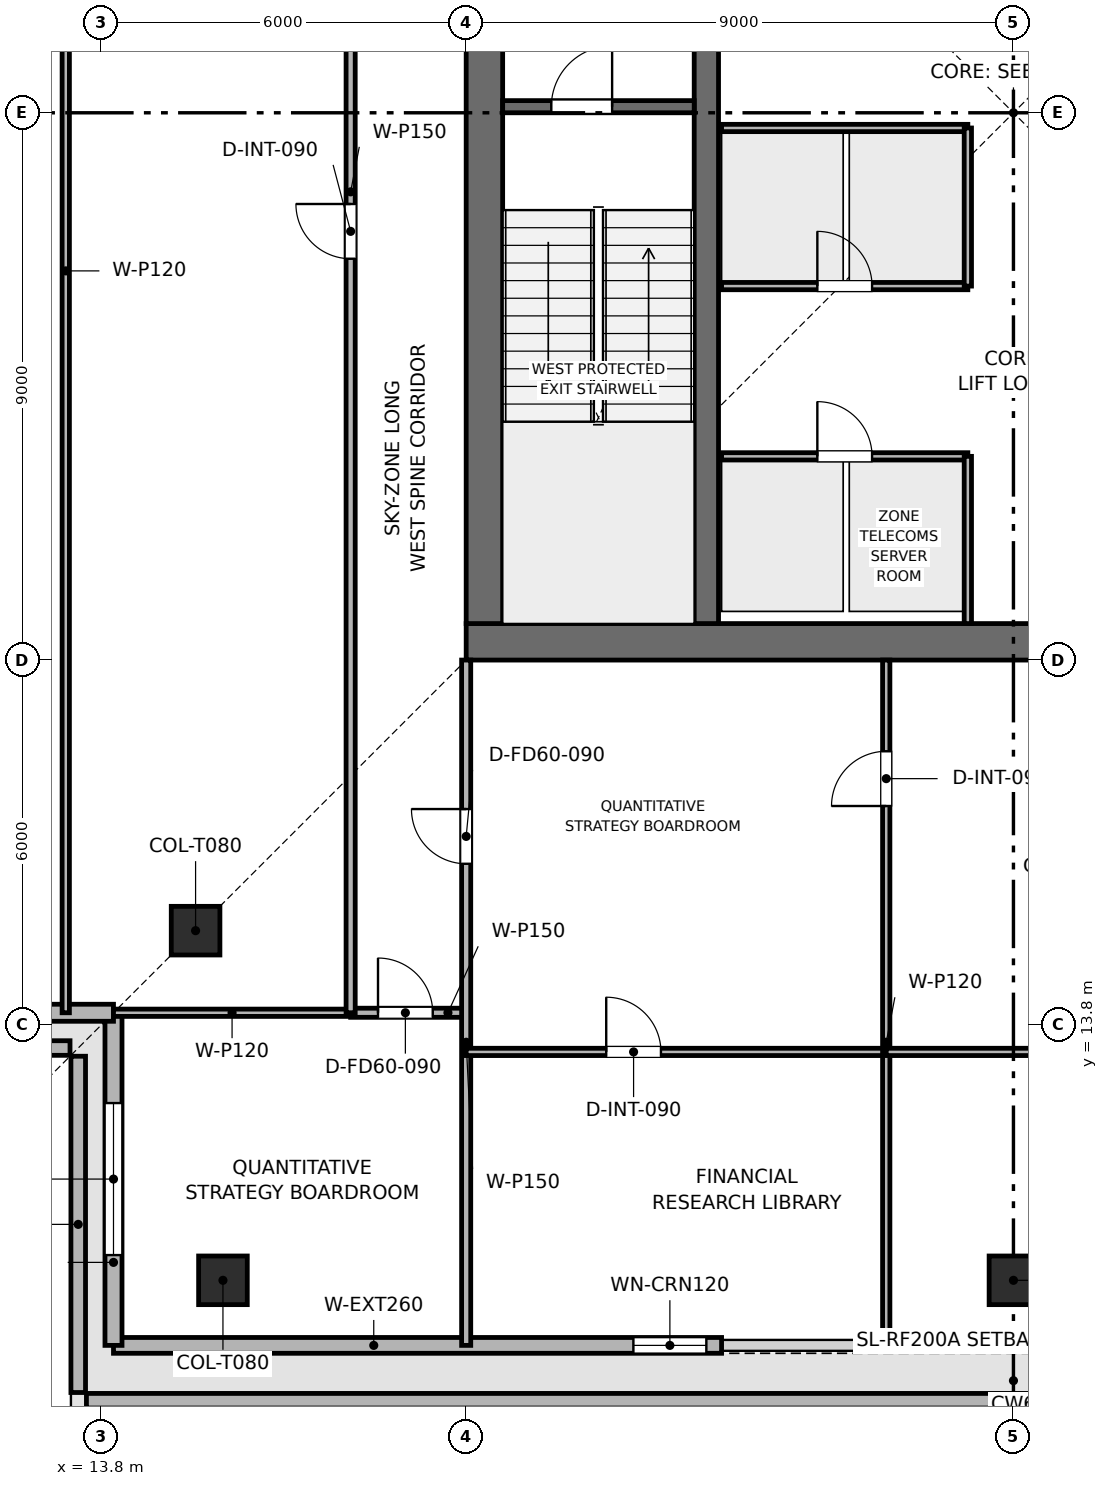
"""IFC4 building model, lengths in metres.
Left out: names, types, materials, properties, quantities, classifications, styles, units other than length and angle.
Written with IfcOpenShell. Run it as: python <this file> out.ifc"""

import sys

from ifc_helpers import new_model, si_unit, direction, frame, frame_2d, origin, origin_2d, place, context, subcontext, project, spatial, rectangle, extrude, element, fill, save


model = new_model("IFC4")
c1 = context("Model", 3, precision=1e-05, world=origin(), true_north=direction((0.0, 1.0)))
c2 = subcontext(c1, "Body", "Model", "MODEL_VIEW")
j1 = project(units=[si_unit("LENGTHUNIT", "METRE"), si_unit("PLANEANGLEUNIT", "RADIAN")], contexts=[c1])
p1 = place(None, origin())
s1 = spatial("IfcSite", under=j1, at=p1, CompositionType="ELEMENT")
p2 = place(p1, origin())
s2 = spatial("IfcBuilding", under=s1, at=p2, CompositionType="ELEMENT")
p3 = place(p2, frame((0.0, 0.0, 355.5)))
s3 = spatial("IfcBuildingStorey", under=s2, at=p3, CompositionType="ELEMENT", Elevation=355.5)
p4 = place(p3, frame((19.8, 20.1, 0.0), z_axis=(0.0, 0.0, 1.0), x_axis=(1.0, 0.0, 0.0)))
e1 = element("IfcWall", 1, at=p4, inside=s3, PredefinedType="SHEAR", context=c2, shape_type="SweptSolid", body=[
    extrude(rectangle(XDim=18.0, YDim=0.6, at=frame_2d((9.0, 0.0))), origin(), (0.0, 0.0, 1.0), 4.5),
])
p5 = place(p3, frame((20.1, 20.4, 0.0), z_axis=(0.0, 0.0, 1.0), x_axis=(0.0, 1.0, 0.0)))
e2 = element("IfcWall", 2, at=p5, inside=s3, PredefinedType="SHEAR", context=c2, shape_type="SweptSolid", body=[
    extrude(rectangle(XDim=16.8, YDim=0.6, at=frame_2d((8.4, 0.0))), origin(), (0.0, 0.0, 1.0), 4.5),
])
p6 = place(p5, frame((10.4, 0.0, 0.0)))
e3 = element("IfcOpeningElement", 3, at=p6, cuts=e2, PredefinedType="OPENING", context=c2, shape_type="SweptSolid", body=[
    extrude(rectangle(XDim=1.1, YDim=2.15, at=frame_2d((0.55, 1.075))), frame((0.0, 0.31, 0.0), z_axis=(0.0, -1.0, 0.0), x_axis=(1.0, 0.0, 0.0)), (0.0, 0.0, 1.0), 0.62),
])
p7 = place(p3, frame((23.75, 20.4, 0.0), z_axis=(0.0, 0.0, 1.0), x_axis=(0.0, 1.0, 0.0)))
e4 = element("IfcWall", 4, at=p7, inside=s3, PredefinedType="SHEAR", context=c2, shape_type="SweptSolid", body=[
    extrude(rectangle(XDim=16.8, YDim=0.4, at=frame_2d((8.4, 0.0))), origin(), (0.0, 0.0, 1.0), 4.5),
])
for number, where, z_axis, x_axis in (
    (5, (15.8, 9.6, 0.003), (0.0, 0.0, 1.0), (1.0, 0.0, 0.0)),
    (6, (28.8, 9.6, 0.003), (0.0, 0.0, 1.0), (1.0, 0.0, 0.0)),
    (7, (15.35, 15.35, 0.003), (0.0, 0.0, 1.0), (1.0, 0.0, 0.0)),
):
    element("IfcColumn", number, at=place(p3, frame(where, z_axis=z_axis, x_axis=x_axis)), inside=s3, PredefinedType="COLUMN", context=c2, shape_type="SweptSolid", body=[
        extrude(rectangle(XDim=0.8, YDim=0.8, at=origin_2d()), origin(), (0.0, 0.0, 1.0), 4.234),
    ])
p8 = place(p3, frame((13.555, 7.62, 0.0), z_axis=(0.0, 0.0, 1.0), x_axis=(1.0, 0.0, 0.0)))
e8 = element("IfcWall", 8, at=p8, inside=s3, PredefinedType="PARAPET", context=c2, shape_type="SweptSolid", body=[
    extrude(rectangle(XDim=30.49, YDim=0.24, at=frame_2d((15.245, 0.0))), origin(), (0.0, 0.0, 1.0), 1.2),
])
for number, where, z_axis, x_axis in (
    (9, (7.755, 13.42, 0.0), (0.0, 0.0, 1.0), (1.0, 0.0, 0.0)),
    (10, (13.42, 13.285, 0.0), (0.0, 0.0, 1.0), (0.0, -1.0, 0.0)),
):
    element("IfcWall", number, at=place(p3, frame(where, z_axis=z_axis, x_axis=x_axis)), inside=s3, PredefinedType="PARAPET", context=c2, shape_type="SweptSolid", body=[
        extrude(rectangle(XDim=5.53, YDim=0.24, at=frame_2d((2.765, 0.0))), origin(), (0.0, 0.0, 1.0), 1.2),
    ])
p9 = place(p3, frame((24.0, 8.53, 0.0), z_axis=(0.0, 0.0, 1.0), x_axis=(-1.0, 0.0, 0.0)))
e11 = element("IfcWall", 11, at=p9, inside=s3, PredefinedType="SOLIDWALL", context=c2, shape_type="SweptSolid", body=[
    extrude(rectangle(XDim=10.0, YDim=0.26, at=frame_2d((5.0, 0.0))), origin(), (0.0, 0.0, 1.0), 4.24),
])
p10 = place(p9, frame((0.25, 0.0, 0.9)))
e12 = element("IfcOpeningElement", 12, at=p10, cuts=e11, PredefinedType="OPENING", context=c2, shape_type="SweptSolid", body=[
    extrude(rectangle(XDim=1.2, YDim=2.1, at=frame_2d((0.6, 1.05))), frame((0.0, 0.14, 0.0), z_axis=(0.0, -1.0, 0.0), x_axis=(1.0, 0.0, 0.0)), (0.0, 0.0, 1.0), 0.28),
])
p11 = place(p3, frame((14.0, 8.53, 0.0), z_axis=(0.0, 0.0, 1.0), x_axis=(0.0, 1.0, 0.0)))
e13 = element("IfcWall", 13, at=p11, inside=s3, PredefinedType="SOLIDWALL", context=c2, shape_type="SweptSolid", body=[
    extrude(rectangle(XDim=5.47, YDim=0.28, at=frame_2d((2.735, 0.0))), origin(), (0.0, 0.0, 1.0), 4.24),
])
p12 = place(p11, frame((1.485, 0.0, 0.9)))
e14 = element("IfcOpeningElement", 14, at=p12, cuts=e13, PredefinedType="OPENING", context=c2, shape_type="SweptSolid", body=[
    extrude(rectangle(XDim=2.5, YDim=1.9, at=frame_2d((1.25, 0.95))), frame((0.0, 0.15, 0.0), z_axis=(0.0, -1.0, 0.0), x_axis=(1.0, 0.0, 0.0)), (0.0, 0.0, 1.0), 0.3),
])
p13 = place(p3, frame((14.0, 14.0, 0.0), z_axis=(0.0, 0.0, 1.0), x_axis=(-1.0, 0.0, 0.0)))
e15 = element("IfcWall", 15, at=p13, inside=s3, PredefinedType="SOLIDWALL", context=c2, shape_type="SweptSolid", body=[
    extrude(rectangle(XDim=5.47, YDim=0.28, at=frame_2d((2.735, 0.0))), origin(), (0.0, 0.0, 1.0), 4.24),
])
p14 = place(p13, frame((1.485, 0.0, 0.9)))
e16 = element("IfcOpeningElement", 16, at=p14, cuts=e15, PredefinedType="OPENING", context=c2, shape_type="SweptSolid", body=[
    extrude(rectangle(XDim=2.5, YDim=1.9, at=frame_2d((1.25, 0.95))), frame((0.0, 0.15, 0.0), z_axis=(0.0, -1.0, 0.0), x_axis=(1.0, 0.0, 0.0)), (0.0, 0.0, 1.0), 0.3),
])
p15 = place(p3, frame((20.4, 28.9, 0.0), z_axis=(0.0, 0.0, 1.0), x_axis=(1.0, 0.0, 0.0)))
e17 = element("IfcWall", 17, at=p15, inside=s3, PredefinedType="SHEAR", context=c2, shape_type="SweptSolid", body=[
    extrude(rectangle(XDim=3.15, YDim=0.2, at=frame_2d((1.575, 0.0))), origin(), (0.0, 0.0, 1.0), 4.24),
])
p16 = place(p15, frame((0.8, 0.0, 0.0)))
e18 = element("IfcOpeningElement", 18, at=p16, cuts=e17, PredefinedType="OPENING", context=c2, shape_type="SweptSolid", body=[
    extrude(rectangle(XDim=1.0, YDim=2.1, at=frame_2d((0.5, 1.05))), frame((0.0, 0.11, 0.0), z_axis=(0.0, -1.0, 0.0), x_axis=(1.0, 0.0, 0.0)), (0.0, 0.0, 1.0), 0.22),
])
p17 = place(p3, frame((24.0, 23.15, 0.0), z_axis=(0.0, 0.0, 1.0), x_axis=(1.0, 0.0, 0.0)))
e19 = element("IfcWall", 19, at=p17, inside=s3, PredefinedType="PARTITIONING", context=c2, shape_type="SweptSolid", body=[
    extrude(rectangle(XDim=4.05, YDim=0.12, at=frame_2d((2.025, 0.0))), origin(), (0.0, 0.0, 1.0), 4.24),
])
p18 = place(p17, frame((1.575, 0.0, 0.0)))
e20 = element("IfcOpeningElement", 20, at=p18, cuts=e19, PredefinedType="OPENING", context=c2, shape_type="SweptSolid", body=[
    extrude(rectangle(XDim=0.9, YDim=2.1, at=frame_2d((0.45, 1.05))), frame((0.0, 0.07, 0.0), z_axis=(0.0, -1.0, 0.0), x_axis=(1.0, 0.0, 0.0)), (0.0, 0.0, 1.0), 0.14),
])
p19 = place(p3, frame((28.05, 20.4, 0.0), z_axis=(0.0, 0.0, 1.0), x_axis=(0.0, 1.0, 0.0)))
e21 = element("IfcWall", 21, at=p19, inside=s3, PredefinedType="PARTITIONING", context=c2, shape_type="SweptSolid", body=[
    extrude(rectangle(XDim=2.75, YDim=0.12, at=frame_2d((1.375, 0.0))), origin(), (0.0, 0.0, 1.0), 4.24),
])
p20 = place(p3, frame((24.0, 25.95, 0.0), z_axis=(0.0, 0.0, 1.0), x_axis=(1.0, 0.0, 0.0)))
e22 = element("IfcWall", 22, at=p20, inside=s3, PredefinedType="PARTITIONING", context=c2, shape_type="SweptSolid", body=[
    extrude(rectangle(XDim=4.05, YDim=0.12, at=frame_2d((2.025, 0.0))), origin(), (0.0, 0.0, 1.0), 4.24),
])
p21 = place(p20, frame((1.575, 0.0, 0.0)))
e23 = element("IfcOpeningElement", 23, at=p21, cuts=e22, PredefinedType="OPENING", context=c2, shape_type="SweptSolid", body=[
    extrude(rectangle(XDim=0.9, YDim=2.1, at=frame_2d((0.45, 1.05))), frame((0.0, 0.07, 0.0), z_axis=(0.0, -1.0, 0.0), x_axis=(1.0, 0.0, 0.0)), (0.0, 0.0, 1.0), 0.14),
])
p22 = place(p3, frame((24.0, 28.55, 0.0), z_axis=(0.0, 0.0, 1.0), x_axis=(1.0, 0.0, 0.0)))
e24 = element("IfcWall", 24, at=p22, inside=s3, PredefinedType="PARTITIONING", context=c2, shape_type="SweptSolid", body=[
    extrude(rectangle(XDim=4.05, YDim=0.12, at=frame_2d((2.025, 0.0))), origin(), (0.0, 0.0, 1.0), 4.24),
])
p23 = place(p3, frame((28.05, 25.95, 0.0), z_axis=(0.0, 0.0, 1.0), x_axis=(0.0, 1.0, 0.0)))
e25 = element("IfcWall", 25, at=p23, inside=s3, PredefinedType="PARTITIONING", context=c2, shape_type="SweptSolid", body=[
    extrude(rectangle(XDim=2.6, YDim=0.12, at=frame_2d((1.3, 0.0))), origin(), (0.0, 0.0, 1.0), 4.24),
])
p24 = place(p3, frame((13.215, 14.0, 0.0), z_axis=(0.0, 0.0, 1.0), x_axis=(0.0, 1.0, 0.0)))
e26 = element("IfcWall", 26, at=p24, inside=s3, PredefinedType="PARTITIONING", context=c2, shape_type="SweptSolid", body=[
    extrude(rectangle(XDim=25.7, YDim=0.12, at=frame_2d((12.85, 0.0))), origin(), (0.0, 0.0, 1.0), 3.825),
])
p25 = place(p24, frame((20.533, 0.0, 0.0)))
e27 = element("IfcOpeningElement", 27, at=p25, cuts=e26, PredefinedType="OPENING", context=c2, shape_type="SweptSolid", body=[
    extrude(rectangle(XDim=0.9, YDim=2.1, at=frame_2d((0.45, 1.05))), frame((0.0, 0.07, 0.0), z_axis=(0.0, -1.0, 0.0), x_axis=(1.0, 0.0, 0.0)), (0.0, 0.0, 1.0), 0.14),
])
p26 = place(p3, frame((14.0, 14.0, 0.0), z_axis=(0.0, 0.0, 1.0), x_axis=(1.0, 0.0, 0.0)))
e28 = element("IfcWall", 28, at=p26, inside=s3, PredefinedType="PARTITIONING", context=c2, shape_type="SweptSolid", body=[
    extrude(rectangle(XDim=3.9, YDim=0.12, at=frame_2d((1.95, 0.0))), origin(), (0.0, 0.0, 1.0), 3.925),
])
p27 = place(p3, frame((17.9, 14.0, 0.0), z_axis=(0.0, 0.0, 1.0), x_axis=(1.0, 0.0, 0.0)))
e29 = element("IfcWall", 29, at=p27, inside=s3, PredefinedType="PARTITIONING", context=c2, shape_type="SweptSolid", body=[
    extrude(rectangle(XDim=1.9, YDim=0.15, at=frame_2d((0.95, 0.0))), origin(), (0.0, 0.0, 1.0), 4.24),
])
p28 = place(p27, frame((0.45, 0.0, 0.0)))
e30 = element("IfcOpeningElement", 30, at=p28, cuts=e29, PredefinedType="OPENING", context=c2, shape_type="SweptSolid", body=[
    extrude(rectangle(XDim=0.9, YDim=2.1, at=frame_2d((0.45, 1.05))), frame((0.0, 0.085, 0.0), z_axis=(0.0, -1.0, 0.0), x_axis=(1.0, 0.0, 0.0)), (0.0, 0.0, 1.0), 0.17),
])
p29 = place(p3, frame((19.8, 8.53, 0.0), z_axis=(0.0, 0.0, 1.0), x_axis=(0.0, 1.0, 0.0)))
e31 = element("IfcWall", 31, at=p29, inside=s3, PredefinedType="PARTITIONING", context=c2, shape_type="SweptSolid", body=[
    extrude(rectangle(XDim=11.27, YDim=0.15, at=frame_2d((5.635, 0.0))), origin(), (0.0, 0.0, 1.0), 3.825),
])
p30 = place(p29, frame((7.92, 0.0, 0.0)))
e32 = element("IfcOpeningElement", 32, at=p30, cuts=e31, PredefinedType="OPENING", context=c2, shape_type="SweptSolid", body=[
    extrude(rectangle(XDim=0.9, YDim=2.1, at=frame_2d((0.45, 1.05))), frame((0.0, 0.085, 0.0), z_axis=(0.0, -1.0, 0.0), x_axis=(1.0, 0.0, 0.0)), (0.0, 0.0, 1.0), 0.17),
])
p31 = place(p3, frame((19.8, 13.356, 0.0), z_axis=(0.0, 0.0, 1.0), x_axis=(1.0, 0.0, 0.0)))
e33 = element("IfcWall", 33, at=p31, inside=s3, PredefinedType="PARTITIONING", context=c2, shape_type="SweptSolid", body=[
    extrude(rectangle(XDim=6.908, YDim=0.12, at=frame_2d((3.454, 0.0))), origin(), (0.0, 0.0, 1.0), 3.825),
])
p32 = place(p31, frame((2.303, 0.0, 0.0)))
e34 = element("IfcOpeningElement", 34, at=p32, cuts=e33, PredefinedType="OPENING", context=c2, shape_type="SweptSolid", body=[
    extrude(rectangle(XDim=0.9, YDim=2.1, at=frame_2d((0.45, 1.05))), frame((0.0, 0.07, 0.0), z_axis=(0.0, -1.0, 0.0), x_axis=(1.0, 0.0, 0.0)), (0.0, 0.0, 1.0), 0.14),
])
p33 = place(p3, frame((26.708, 8.53, 0.0), z_axis=(0.0, 0.0, 1.0), x_axis=(0.0, 1.0, 0.0)))
e35 = element("IfcWall", 35, at=p33, inside=s3, PredefinedType="PARTITIONING", context=c2, shape_type="SweptSolid", body=[
    extrude(rectangle(XDim=11.27, YDim=0.12, at=frame_2d((5.635, 0.0))), origin(), (0.0, 0.0, 1.0), 3.865),
])
p34 = place(p33, frame((8.87, 0.0, 0.0)))
e36 = element("IfcOpeningElement", 36, at=p34, cuts=e35, PredefinedType="OPENING", context=c2, shape_type="SweptSolid", body=[
    extrude(rectangle(XDim=0.9, YDim=2.1, at=frame_2d((0.45, 1.05))), frame((0.0, 0.07, 0.0), z_axis=(0.0, -1.0, 0.0), x_axis=(1.0, 0.0, 0.0)), (0.0, 0.0, 1.0), 0.14),
])
p35 = place(p3, frame((26.708, 13.356, 0.0), z_axis=(0.0, 0.0, 1.0), x_axis=(1.0, 0.0, 0.0)))
e37 = element("IfcWall", 37, at=p35, inside=s3, PredefinedType="PARTITIONING", context=c2, shape_type="SweptSolid", body=[
    extrude(rectangle(XDim=16.892, YDim=0.12, at=frame_2d((8.446, 0.0))), origin(), (0.0, 0.0, 1.0), 3.825),
])
p36 = place(p35, frame((7.996, 0.0, 0.0)))
e38 = element("IfcOpeningElement", 38, at=p36, cuts=e37, PredefinedType="OPENING", context=c2, shape_type="SweptSolid", body=[
    extrude(rectangle(XDim=0.9, YDim=2.1, at=frame_2d((0.45, 1.05))), frame((0.0, 0.07, 0.0), z_axis=(0.0, -1.0, 0.0), x_axis=(1.0, 0.0, 0.0)), (0.0, 0.0, 1.0), 0.14),
])
p37 = place(p3, frame((17.9, 14.0, 0.0), z_axis=(0.0, 0.0, 1.0), x_axis=(0.0, 1.0, 0.0)))
e39 = element("IfcWall", 39, at=p37, inside=s3, PredefinedType="PARTITIONING", context=c2, shape_type="SweptSolid", body=[
    extrude(rectangle(XDim=25.7, YDim=0.15, at=frame_2d((12.85, 0.0))), origin(), (0.0, 0.0, 1.0), 3.825),
])
p38 = place(p37, frame((12.4, 0.0, 0.0)))
e40 = element("IfcOpeningElement", 40, at=p38, cuts=e39, PredefinedType="OPENING", context=c2, shape_type="SweptSolid", body=[
    extrude(rectangle(XDim=0.9, YDim=2.1, at=frame_2d((0.45, 1.05))), frame((0.0, 0.085, 0.0), z_axis=(0.0, -1.0, 0.0), x_axis=(1.0, 0.0, 0.0)), (0.0, 0.0, 1.0), 0.17),
])
p39 = place(p10, origin())
e41 = element("IfcWindow", 41, at=p39, inside=s3, PartitioningType="SINGLE_PANEL", PredefinedType="WINDOW", context=c2, shape_type="SweptSolid", body=[
    extrude(rectangle(XDim=1.2, YDim=2.1, at=frame_2d((0.6, 1.05))), frame((0.0, 0.03, 0.0), z_axis=(0.0, -1.0, 0.0), x_axis=(1.0, 0.0, 0.0)), (0.0, 0.0, 1.0), 0.06),
])
fill(e12, e41)
p40 = place(p12, origin())
e42 = element("IfcWindow", 42, at=p40, inside=s3, PartitioningType="SINGLE_PANEL", PredefinedType="WINDOW", context=c2, shape_type="SweptSolid", body=[
    extrude(rectangle(XDim=2.5, YDim=1.9, at=frame_2d((1.25, 0.95))), frame((0.0, 0.03, 0.0), z_axis=(0.0, -1.0, 0.0), x_axis=(1.0, 0.0, 0.0)), (0.0, 0.0, 1.0), 0.06),
])
fill(e14, e42)
p41 = place(p16, origin())
e43 = element("IfcDoor", 43, at=p41, inside=s3, OperationType="SINGLE_SWING_RIGHT", PredefinedType="DOOR", context=c2, shape_type="SweptSolid", body=[
    extrude(rectangle(XDim=1.0, YDim=2.1, at=frame_2d((0.5, 1.05))), frame((0.0, 0.025, 0.0), z_axis=(0.0, -1.0, 0.0), x_axis=(1.0, 0.0, 0.0)), (0.0, 0.0, 1.0), 0.05),
])
fill(e18, e43)
p42 = place(p18, origin())
e44 = element("IfcDoor", 44, at=p42, inside=s3, OperationType="SINGLE_SWING_LEFT", PredefinedType="DOOR", context=c2, shape_type="SweptSolid", body=[
    extrude(rectangle(XDim=0.9, YDim=2.1, at=frame_2d((0.45, 1.05))), frame((0.0, 0.025, 0.0), z_axis=(0.0, -1.0, 0.0), x_axis=(1.0, 0.0, 0.0)), (0.0, 0.0, 1.0), 0.05),
])
fill(e20, e44)
p43 = place(p21, origin())
e45 = element("IfcDoor", 45, at=p43, inside=s3, OperationType="SINGLE_SWING_LEFT", PredefinedType="DOOR", context=c2, shape_type="SweptSolid", body=[
    extrude(rectangle(XDim=0.9, YDim=2.1, at=frame_2d((0.45, 1.05))), frame((0.0, 0.025, 0.0), z_axis=(0.0, -1.0, 0.0), x_axis=(1.0, 0.0, 0.0)), (0.0, 0.0, 1.0), 0.05),
])
fill(e23, e45)
p44 = place(p28, origin())
e46 = element("IfcDoor", 46, at=p44, inside=s3, OperationType="SINGLE_SWING_LEFT", PredefinedType="DOOR", context=c2, shape_type="SweptSolid", body=[
    extrude(rectangle(XDim=0.9, YDim=2.1, at=frame_2d((0.45, 1.05))), frame((0.0, 0.025, 0.0), z_axis=(0.0, -1.0, 0.0), x_axis=(1.0, 0.0, 0.0)), (0.0, 0.0, 1.0), 0.05),
])
fill(e30, e46)
p45 = place(p30, origin())
e47 = element("IfcDoor", 47, at=p45, inside=s3, OperationType="SINGLE_SWING_RIGHT", PredefinedType="DOOR", context=c2, shape_type="SweptSolid", body=[
    extrude(rectangle(XDim=0.9, YDim=2.1, at=frame_2d((0.45, 1.05))), frame((0.0, 0.025, 0.0), z_axis=(0.0, -1.0, 0.0), x_axis=(1.0, 0.0, 0.0)), (0.0, 0.0, 1.0), 0.05),
])
fill(e32, e47)
p46 = place(p32, origin())
e48 = element("IfcDoor", 48, at=p46, inside=s3, OperationType="SINGLE_SWING_LEFT", PredefinedType="DOOR", context=c2, shape_type="SweptSolid", body=[
    extrude(rectangle(XDim=0.9, YDim=2.1, at=frame_2d((0.45, 1.05))), frame((0.0, 0.025, 0.0), z_axis=(0.0, -1.0, 0.0), x_axis=(1.0, 0.0, 0.0)), (0.0, 0.0, 1.0), 0.05),
])
fill(e34, e48)
p47 = place(p34, origin())
e49 = element("IfcDoor", 49, at=p47, inside=s3, OperationType="SINGLE_SWING_LEFT", PredefinedType="DOOR", context=c2, shape_type="SweptSolid", body=[
    extrude(rectangle(XDim=0.9, YDim=2.1, at=frame_2d((0.45, 1.05))), frame((0.0, 0.025, 0.0), z_axis=(0.0, -1.0, 0.0), x_axis=(1.0, 0.0, 0.0)), (0.0, 0.0, 1.0), 0.05),
])
fill(e36, e49)
p48 = place(p38, origin())
e50 = element("IfcDoor", 50, at=p48, inside=s3, OperationType="SINGLE_SWING_RIGHT", PredefinedType="DOOR", context=c2, shape_type="SweptSolid", body=[
    extrude(rectangle(XDim=0.9, YDim=2.1, at=frame_2d((0.45, 1.05))), frame((0.0, 0.025, 0.0), z_axis=(0.0, -1.0, 0.0), x_axis=(1.0, 0.0, 0.0)), (0.0, 0.0, 1.0), 0.05),
])
fill(e40, e50)
save(model, sys.argv[1])
